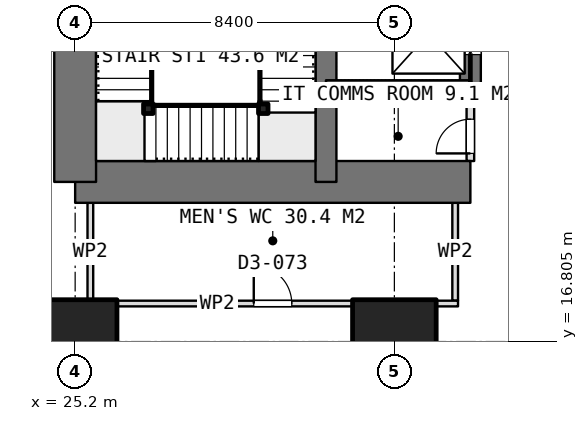
"""IFC4 building model, lengths in metres.
Left out: names, types, materials, properties, quantities, classifications, styles, units other than length and angle.
Written with IfcOpenShell. Run it as: python <this file> out.ifc"""

import sys

from ifc_helpers import new_model, si_unit, direction, frame, frame_2d, origin, origin_2d, place, context, subcontext, project, spatial, rectangle, extrude, element, fill, save


model = new_model("IFC4")
c1 = context("Model", 3, precision=1e-05, world=origin(), true_north=direction((0.0, 1.0)))
c2 = subcontext(c1, "Body", "Model", "MODEL_VIEW")
j1 = project(units=[si_unit("LENGTHUNIT", "METRE"), si_unit("PLANEANGLEUNIT", "RADIAN")], contexts=[c1])
p1 = place(None, origin())
s1 = spatial("IfcSite", under=j1, at=p1, CompositionType="ELEMENT")
p2 = place(p1, origin())
s2 = spatial("IfcBuilding", under=s1, at=p2, CompositionType="ELEMENT")
p3 = place(p2, frame((0.0, 0.0, 66.65)))
s3 = spatial("IfcBuildingStorey", under=s2, at=p3, CompositionType="ELEMENT", Elevation=66.65)
p4 = place(p3, frame((25.2, 21.0, 0.0), z_axis=(0.0, 0.0, 1.0), x_axis=(1.0, 0.0, 0.0)))
e1 = element("IfcWall", 1, at=p4, inside=s3, PredefinedType="SHEAR", context=c2, shape_type="SweptSolid", body=[
    extrude(rectangle(XDim=10.4, YDim=1.1, at=frame_2d((5.2, 0.0))), origin(), (0.0, 0.0, 1.0), 3.75),
])
p5 = place(p3, frame((25.2, 21.0, 0.0), z_axis=(0.0, 0.0, 1.0), x_axis=(0.0, 1.0, 0.0)))
e2 = element("IfcWall", 2, at=p5, inside=s3, PredefinedType="SHEAR", context=c2, shape_type="SweptSolid", body=[
    extrude(rectangle(XDim=25.2, YDim=1.1, at=frame_2d((12.6, 0.0))), origin(), (0.0, 0.0, 1.0), 3.75),
])
p6 = place(p5, frame((7.8, 0.0, 0.0)))
e3 = element("IfcOpeningElement", 3, at=p6, cuts=e2, PredefinedType="OPENING", context=c2, shape_type="SweptSolid", body=[
    extrude(rectangle(XDim=1.2, YDim=2.1, at=frame_2d((0.6, 1.05))), frame((0.0, 0.56, 0.0), z_axis=(0.0, -1.0, 0.0), x_axis=(1.0, 0.0, 0.0)), (0.0, 0.0, 1.0), 1.12),
])
p7 = place(p5, frame((14.25, 0.0, 0.0)))
e4 = element("IfcOpeningElement", 4, at=p7, cuts=e2, PredefinedType="OPENING", context=c2, shape_type="SweptSolid", body=[
    extrude(rectangle(XDim=0.9, YDim=2.1, at=frame_2d((0.45, 1.05))), frame((0.0, 0.56, 0.0), z_axis=(0.0, -1.0, 0.0), x_axis=(1.0, 0.0, 0.0)), (0.0, 0.0, 1.0), 1.12),
])
p8 = place(p5, frame((16.85, 0.0, 0.0)))
e5 = element("IfcOpeningElement", 5, at=p8, cuts=e2, PredefinedType="OPENING", context=c2, shape_type="SweptSolid", body=[
    extrude(rectangle(XDim=0.9, YDim=2.1, at=frame_2d((0.45, 1.05))), frame((0.0, 0.56, 0.0), z_axis=(0.0, -1.0, 0.0), x_axis=(1.0, 0.0, 0.0)), (0.0, 0.0, 1.0), 1.12),
])
p9 = place(p5, frame((19.075, 0.0, 0.0)))
e6 = element("IfcOpeningElement", 6, at=p9, cuts=e2, PredefinedType="OPENING", context=c2, shape_type="SweptSolid", body=[
    extrude(rectangle(XDim=1.2, YDim=2.1, at=frame_2d((0.6, 1.05))), frame((0.0, 0.56, 0.0), z_axis=(0.0, -1.0, 0.0), x_axis=(1.0, 0.0, 0.0)), (0.0, 0.0, 1.0), 1.12),
])
p10 = place(p3, frame((31.8, 21.0, 0.0), z_axis=(0.0, 0.0, 1.0), x_axis=(0.0, 1.0, 0.0)))
e7 = element("IfcWall", 7, at=p10, inside=s3, PredefinedType="SHEAR", context=c2, shape_type="SweptSolid", body=[
    extrude(rectangle(XDim=25.2, YDim=0.55, at=frame_2d((12.6, 0.0))), origin(), (0.0, 0.0, 1.0), 3.75),
])
p11 = place(p3, frame((35.6, 23.4, 0.0), z_axis=(0.0, 0.0, 1.0), x_axis=(0.0, 1.0, 0.0)))
e8 = element("IfcWall", 8, at=p11, inside=s3, PredefinedType="SHEAR", context=c2, shape_type="SweptSolid", body=[
    extrude(rectangle(XDim=18.0, YDim=0.55, at=frame_2d((9.0, 0.0))), origin(), (0.0, 0.0, 1.0), 3.75),
])
p12 = place(p11, frame((0.95, 0.0, 0.0)))
e9 = element("IfcOpeningElement", 9, at=p12, cuts=e8, PredefinedType="OPENING", context=c2, shape_type="SweptSolid", body=[
    extrude(rectangle(XDim=1.1, YDim=2.1, at=frame_2d((0.55, 1.05))), frame((0.0, 0.285, 0.0), z_axis=(0.0, -1.0, 0.0), x_axis=(1.0, 0.0, 0.0)), (0.0, 0.0, 1.0), 0.57),
])
p13 = place(p11, frame((3.95, 0.0, 0.0)))
e10 = element("IfcOpeningElement", 10, at=p13, cuts=e8, PredefinedType="OPENING", context=c2, shape_type="SweptSolid", body=[
    extrude(rectangle(XDim=1.1, YDim=2.1, at=frame_2d((0.55, 1.05))), frame((0.0, 0.285, 0.0), z_axis=(0.0, -1.0, 0.0), x_axis=(1.0, 0.0, 0.0)), (0.0, 0.0, 1.0), 0.57),
])
p14 = place(p11, frame((6.95, 0.0, 0.0)))
e11 = element("IfcOpeningElement", 11, at=p14, cuts=e8, PredefinedType="OPENING", context=c2, shape_type="SweptSolid", body=[
    extrude(rectangle(XDim=1.1, YDim=2.1, at=frame_2d((0.55, 1.05))), frame((0.0, 0.285, 0.0), z_axis=(0.0, -1.0, 0.0), x_axis=(1.0, 0.0, 0.0)), (0.0, 0.0, 1.0), 0.57),
])
p15 = place(p11, frame((9.95, 0.0, 0.0)))
e12 = element("IfcOpeningElement", 12, at=p15, cuts=e8, PredefinedType="OPENING", context=c2, shape_type="SweptSolid", body=[
    extrude(rectangle(XDim=1.1, YDim=2.1, at=frame_2d((0.55, 1.05))), frame((0.0, 0.285, 0.0), z_axis=(0.0, -1.0, 0.0), x_axis=(1.0, 0.0, 0.0)), (0.0, 0.0, 1.0), 0.57),
])
p16 = place(p11, frame((12.95, 0.0, 0.0)))
e13 = element("IfcOpeningElement", 13, at=p16, cuts=e8, PredefinedType="OPENING", context=c2, shape_type="SweptSolid", body=[
    extrude(rectangle(XDim=1.1, YDim=2.1, at=frame_2d((0.55, 1.05))), frame((0.0, 0.285, 0.0), z_axis=(0.0, -1.0, 0.0), x_axis=(1.0, 0.0, 0.0)), (0.0, 0.0, 1.0), 0.57),
])
p17 = place(p11, frame((15.95, 0.0, 0.0)))
e14 = element("IfcOpeningElement", 14, at=p17, cuts=e8, PredefinedType="OPENING", context=c2, shape_type="SweptSolid", body=[
    extrude(rectangle(XDim=1.1, YDim=2.1, at=frame_2d((0.55, 1.05))), frame((0.0, 0.285, 0.0), z_axis=(0.0, -1.0, 0.0), x_axis=(1.0, 0.0, 0.0)), (0.0, 0.0, 1.0), 0.57),
])
p18 = place(p3, frame((31.8, 23.4, 0.0), z_axis=(0.0, 0.0, 1.0), x_axis=(1.0, 0.0, 0.0)))
e15 = element("IfcWall", 15, at=p18, inside=s3, PredefinedType="SHEAR", context=c2, shape_type="SweptSolid", body=[
    extrude(rectangle(XDim=3.8, YDim=0.55, at=frame_2d((1.9, 0.0))), origin(), (0.0, 0.0, 1.0), 3.75),
])
for number, where, z_axis, x_axis in (
    (16, (25.2, 16.8, 0.0), (0.0, 0.0, 1.0), (1.0, 0.0, 0.0)),
    (17, (33.6, 16.8, 0.0), (0.0, 0.0, 1.0), (1.0, 0.0, 0.0)),
):
    element("IfcColumn", number, at=place(p3, frame(where, z_axis=z_axis, x_axis=x_axis)), inside=s3, PredefinedType="COLUMN", context=c2, shape_type="SweptSolid", body=[
        extrude(rectangle(XDim=2.2, YDim=2.2, at=origin_2d()), origin(), (0.0, 0.0, 1.0), 3.75),
    ])
p19 = place(p3, frame((35.6, 21.55, 0.0), z_axis=(0.0, 0.0, 1.0), x_axis=(0.0, 1.0, 0.0)))
e18 = element("IfcWall", 18, at=p19, inside=s3, PredefinedType="PARTITIONING", context=c2, shape_type="SweptSolid", body=[
    extrude(rectangle(XDim=1.575, YDim=0.2, at=frame_2d((0.788, 0.0))), origin(), (0.0, 0.0, 1.0), 3.5),
])
p20 = place(p19, frame((0.2, 0.0, 0.0)))
e19 = element("IfcOpeningElement", 19, at=p20, cuts=e18, PredefinedType="OPENING", context=c2, shape_type="SweptSolid", body=[
    extrude(rectangle(XDim=0.9, YDim=2.1, at=frame_2d((0.45, 1.05))), frame((0.0, 0.11, 0.0), z_axis=(0.0, -1.0, 0.0), x_axis=(1.0, 0.0, 0.0)), (0.0, 0.0, 1.0), 0.22),
])
p21 = place(p3, frame((25.525, 17.8, 0.0), z_axis=(0.0, 0.0, 1.0), x_axis=(1.0, 0.0, 0.0)))
e20 = element("IfcWall", 20, at=p21, inside=s3, PredefinedType="PARTITIONING", context=c2, shape_type="SweptSolid", body=[
    extrude(rectangle(XDim=9.75, YDim=0.15, at=frame_2d((4.875, 0.0))), origin(), (0.0, 0.0, 1.0), 3.5),
])
p22 = place(p21, frame((4.375, 0.0, 0.0)))
e21 = element("IfcOpeningElement", 21, at=p22, cuts=e20, PredefinedType="OPENING", context=c2, shape_type="SweptSolid", body=[
    extrude(rectangle(XDim=1.0, YDim=2.1, at=frame_2d((0.5, 1.05))), frame((0.0, 0.085, 0.0), z_axis=(0.0, -1.0, 0.0), x_axis=(1.0, 0.0, 0.0)), (0.0, 0.0, 1.0), 0.17),
])
for number, where, z_axis, x_axis in (
    (22, (25.6, 17.875, 0.0), (0.0, 0.0, 1.0), (0.0, 1.0, 0.0)),
    (23, (35.2, 17.875, 0.0), (0.0, 0.0, 1.0), (0.0, 1.0, 0.0)),
):
    element("IfcWall", number, at=place(p3, frame(where, z_axis=z_axis, x_axis=x_axis)), inside=s3, PredefinedType="PARTITIONING", context=c2, shape_type="SweptSolid", body=[
        extrude(rectangle(XDim=2.575, YDim=0.15, at=frame_2d((1.288, 0.0))), origin(), (0.0, 0.0, 1.0), 3.5),
    ])
for number, where, z_axis, x_axis in (
    (24, (30.15, 22.925, 0.0), (0.0, 0.0, 1.0), (1.0, 0.0, 0.0)),
    (25, (27.125, 22.925, 0.0), (0.0, 0.0, 1.0), (1.0, 0.0, 0.0)),
):
    element("IfcColumn", number, at=place(p3, frame(where, z_axis=z_axis, x_axis=x_axis)), inside=s3, PredefinedType="COLUMN", context=c2, shape_type="SweptSolid", body=[
        extrude(rectangle(XDim=0.25, YDim=0.25, at=origin_2d()), origin(), (0.0, 0.0, 1.0), 3.75),
    ])
p23 = place(p20, origin())
e26 = element("IfcDoor", 26, at=p23, inside=s3, OperationType="SINGLE_SWING_LEFT", PredefinedType="DOOR", context=c2, shape_type="SweptSolid", body=[
    extrude(rectangle(XDim=0.9, YDim=2.1, at=frame_2d((0.45, 1.05))), frame((0.0, 0.025, 0.0), z_axis=(0.0, -1.0, 0.0), x_axis=(1.0, 0.0, 0.0)), (0.0, 0.0, 1.0), 0.05),
])
fill(e19, e26)
p24 = place(p12, origin())
e27 = element("IfcDoor", 27, at=p24, inside=s3, OperationType="SLIDING_TO_LEFT", PredefinedType="USERDEFINED", context=c2, shape_type="SweptSolid", body=[
    extrude(rectangle(XDim=1.1, YDim=2.1, at=frame_2d((0.55, 1.05))), frame((0.0, 0.025, 0.0), z_axis=(0.0, -1.0, 0.0), x_axis=(1.0, 0.0, 0.0)), (0.0, 0.0, 1.0), 0.05),
])
fill(e9, e27)
p25 = place(p22, origin())
e28 = element("IfcDoor", 28, at=p25, inside=s3, OperationType="SINGLE_SWING_LEFT", PredefinedType="DOOR", context=c2, shape_type="SweptSolid", body=[
    extrude(rectangle(XDim=1.0, YDim=2.1, at=frame_2d((0.5, 1.05))), frame((0.0, 0.025, 0.0), z_axis=(0.0, -1.0, 0.0), x_axis=(1.0, 0.0, 0.0)), (0.0, 0.0, 1.0), 0.05),
])
fill(e21, e28)
save(model, sys.argv[1])
